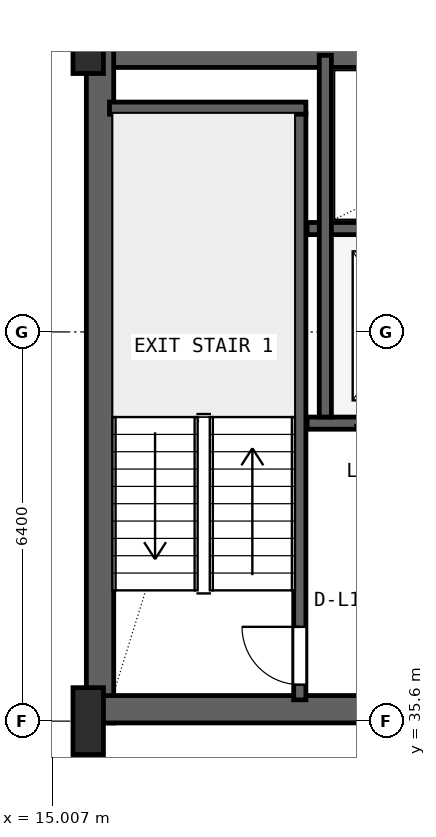
"""IFC4 building model, lengths in metres.
Left out: names, types, materials, properties, quantities, classifications, styles, units other than length and angle.
Written with IfcOpenShell. Run it as: python <this file> out.ifc"""

import sys

from ifc_helpers import new_model, si_unit, direction, frame, frame_2d, origin, origin_2d, place, context, subcontext, project, spatial, rectangle, i_section, extrude, source, transform, mapped, element, fill, save


model = new_model("IFC4")
c1 = context("Model", 3, precision=1e-05, world=origin(), true_north=direction((0.0, 1.0)))
c2 = subcontext(c1, "Body", "Model", "MODEL_VIEW")
j1 = project(units=[si_unit("LENGTHUNIT", "METRE"), si_unit("PLANEANGLEUNIT", "RADIAN")], contexts=[c1])
p1 = place(None, origin())
s1 = spatial("IfcSite", under=j1, at=p1, CompositionType="ELEMENT")
p2 = place(p1, origin())
s2 = spatial("IfcBuilding", under=s1, at=p2, CompositionType="ELEMENT")
p3 = place(p2, frame((0.0, 0.0, 74.4)))
s3 = spatial("IfcBuildingStorey", under=s2, at=p3, CompositionType="ELEMENT", Elevation=74.4)
p4 = place(p3, frame((15.6, 46.575, 0.0), z_axis=(0.0, 0.0, 1.0), x_axis=(1.0, 0.0, 0.0)))
e1 = element("IfcWall", 1, at=p4, inside=s3, PredefinedType="SHEAR", context=c2, shape_type="SweptSolid", body=[
    extrude(rectangle(XDim=36.8, YDim=0.45, at=frame_2d((18.4, 0.0))), origin(), (0.0, 0.0, 1.0), 3.65),
])
p5 = place(p3, frame((15.795, 35.57, 0.0), z_axis=(0.0, 0.0, 1.0), x_axis=(0.0, 1.0, 0.0)))
e2 = element("IfcWall", 2, at=p5, inside=s3, PredefinedType="SHEAR", context=c2, shape_type="SweptSolid", body=[
    extrude(rectangle(XDim=11.23, YDim=0.45, at=frame_2d((5.615, 0.0))), origin(), (0.0, 0.0, 1.0), 3.65),
])
p6 = place(p3, frame((15.57, 35.795, 0.0), z_axis=(0.0, 0.0, 1.0), x_axis=(1.0, 0.0, 0.0)))
e3 = element("IfcWall", 3, at=p6, inside=s3, PredefinedType="SHEAR", context=c2, shape_type="SweptSolid", body=[
    extrude(rectangle(XDim=9.23, YDim=0.45, at=frame_2d((4.615, 0.0))), origin(), (0.0, 0.0, 1.0), 3.65),
])
p7 = place(p6, frame((5.4, 0.0, 0.0)))
e4 = element("IfcOpeningElement", 4, at=p7, cuts=e3, PredefinedType="OPENING", context=c2, shape_type="SweptSolid", body=[
    extrude(rectangle(XDim=1.0, YDim=2.1, at=frame_2d((0.5, 1.05))), frame((0.0, 0.235, 0.0), z_axis=(0.0, -1.0, 0.0), x_axis=(1.0, 0.0, 0.0)), (0.0, 0.0, 1.0), 0.47),
])
m1 = source(origin(), c2, "Body", "SweptSolid", [
    extrude(i_section(OverallWidth=0.5, OverallDepth=1.1, WebThickness=0.018, FlangeThickness=0.032, FilletRadius=0.018, at=origin_2d()), origin(), (0.0, 0.0, 1.0), 3.9),
])
for number, where, z_axis, x_axis in (
    (5, (15.6, 35.6, 0.0), (0.0, 0.0, 1.0), (1.0, 0.0, 0.0)),
    (6, (15.6, 46.8, 0.0), (0.0, 0.0, 1.0), (1.0, 0.0, 0.0)),
):
    element("IfcColumn", number, at=place(p3, frame(where, z_axis=z_axis, x_axis=x_axis)), inside=s3, PredefinedType="COLUMN", context=c2, shape_type="MappedRepresentation", body=[
        mapped(m1, transform((0.0, 0.0, 0.0), x_axis=(1.0, 0.0, 0.0), y_axis=(0.0, 1.0, 0.0), z_axis=(0.0, 0.0, 1.0), scale=1.0)),
    ])
p8 = place(p3, frame((19.08, 35.95, 0.0), z_axis=(0.0, 0.0, 1.0), x_axis=(0.0, 1.0, 0.0)))
e7 = element("IfcWall", 7, at=p8, inside=s3, PredefinedType="SHEAR", context=c2, shape_type="SweptSolid", body=[
    extrude(rectangle(XDim=9.65, YDim=0.2, at=frame_2d((4.825, 0.0))), origin(), (0.0, 0.0, 1.0), 3.65),
])
p9 = place(p8, frame((0.25, 0.0, 0.0)))
e8 = element("IfcOpeningElement", 8, at=p9, cuts=e7, PredefinedType="OPENING", context=c2, shape_type="SweptSolid", body=[
    extrude(rectangle(XDim=0.95, YDim=2.1, at=frame_2d((0.475, 1.05))), frame((0.0, 0.11, 0.0), z_axis=(0.0, -1.0, 0.0), x_axis=(1.0, 0.0, 0.0)), (0.0, 0.0, 1.0), 0.22),
])
p10 = place(p3, frame((15.95, 45.68, 0.0), z_axis=(0.0, 0.0, 1.0), x_axis=(1.0, 0.0, 0.0)))
e9 = element("IfcWall", 9, at=p10, inside=s3, PredefinedType="SHEAR", context=c2, shape_type="SweptSolid", body=[
    extrude(rectangle(XDim=3.23, YDim=0.2, at=frame_2d((1.615, 0.0))), origin(), (0.0, 0.0, 1.0), 3.65),
])
p11 = place(p3, frame((19.2, 40.5, 0.0), z_axis=(0.0, 0.0, 1.0), x_axis=(1.0, 0.0, 0.0)))
e10 = element("IfcWall", 10, at=p11, inside=s3, PredefinedType="SHEAR", context=c2, shape_type="SweptSolid", body=[
    extrude(rectangle(XDim=5.52, YDim=0.2, at=frame_2d((2.76, 0.0))), origin(), (0.0, 0.0, 1.0), 3.65),
])
p12 = place(p11, frame((1.05, 0.0, 0.0)))
e11 = element("IfcOpeningElement", 11, at=p12, cuts=e10, PredefinedType="OPENING", context=c2, shape_type="SweptSolid", body=[
    extrude(rectangle(XDim=1.1, YDim=2.18, at=frame_2d((0.55, 1.09))), frame((0.0, 0.11, 0.0), z_axis=(0.0, -1.0, 0.0), x_axis=(1.0, 0.0, 0.0)), (0.0, 0.0, 1.0), 0.22),
])
p13 = place(p11, frame((3.65, 0.0, 0.0)))
e12 = element("IfcOpeningElement", 12, at=p13, cuts=e10, PredefinedType="OPENING", context=c2, shape_type="SweptSolid", body=[
    extrude(rectangle(XDim=1.1, YDim=2.18, at=frame_2d((0.55, 1.09))), frame((0.0, 0.11, 0.0), z_axis=(0.0, -1.0, 0.0), x_axis=(1.0, 0.0, 0.0)), (0.0, 0.0, 1.0), 0.22),
])
p14 = place(p3, frame((19.2, 43.7, 0.0), z_axis=(0.0, 0.0, 1.0), x_axis=(1.0, 0.0, 0.0)))
e13 = element("IfcWall", 13, at=p14, inside=s3, PredefinedType="SHEAR", context=c2, shape_type="SweptSolid", body=[
    extrude(rectangle(XDim=5.52, YDim=0.2, at=frame_2d((2.76, 0.0))), origin(), (0.0, 0.0, 1.0), 3.65),
])
p15 = place(p3, frame((19.5, 40.6, 0.0), z_axis=(0.0, 0.0, 1.0), x_axis=(0.0, 1.0, 0.0)))
e14 = element("IfcWall", 14, at=p15, inside=s3, PredefinedType="SHEAR", context=c2, shape_type="SweptSolid", body=[
    extrude(rectangle(XDim=5.95, YDim=0.2, at=frame_2d((2.975, 0.0))), origin(), (0.0, 0.0, 1.0), 3.65),
])
m2 = source(origin(), c2, "Body", "SweptSolid", [
    extrude(rectangle(XDim=0.95, YDim=2.1, at=frame_2d((0.475, 1.05))), frame((0.0, 0.025, 0.0), z_axis=(0.0, -1.0, 0.0), x_axis=(1.0, 0.0, 0.0)), (0.0, 0.0, 1.0), 0.05),
])
p16 = place(p9, origin())
e15 = element("IfcDoor", 15, at=p16, inside=s3, OperationType="SINGLE_SWING_RIGHT", PredefinedType="DOOR", context=c2, shape_type="MappedRepresentation", body=[
    mapped(m2, transform((0.0, 0.0, 0.0), x_axis=(1.0, 0.0, 0.0), y_axis=(0.0, 1.0, 0.0), z_axis=(0.0, 0.0, 1.0), scale=1.0)),
])
fill(e8, e15)
save(model, sys.argv[1])
